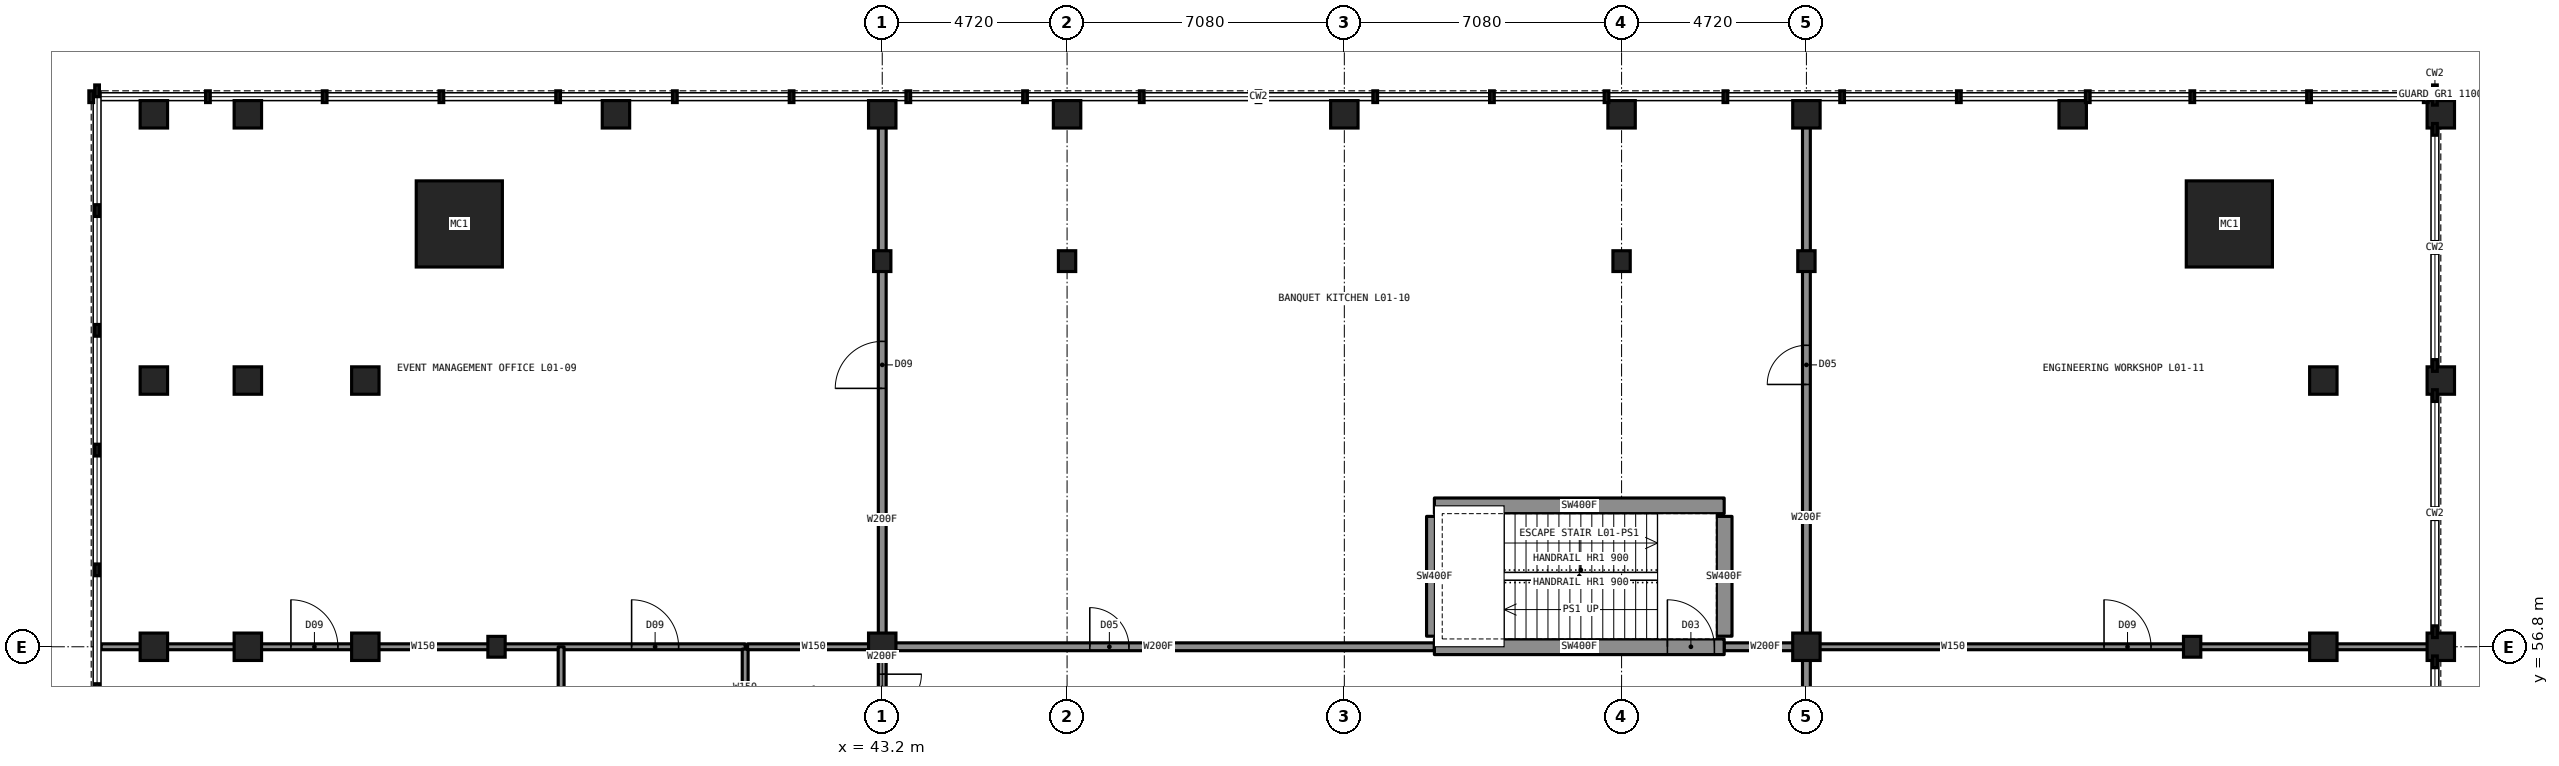
"""IFC4 building model, lengths in metres.
Left out: names, types, materials, properties, quantities, classifications, styles, units other than length and angle.
Written with IfcOpenShell. Run it as: python <this file> out.ifc"""

import sys

from ifc_helpers import new_model, si_unit, direction, frame, frame_2d, origin, origin_2d, place, context, subcontext, project, spatial, rectangle, hollow_rectangle, i_section, extrude, element, fill, save


model = new_model("IFC4")
c1 = context("Model", 3, precision=1e-05, world=origin(), true_north=direction((0.0, 1.0)))
c2 = subcontext(c1, "Body", "Model", "MODEL_VIEW")
j1 = project(units=[si_unit("LENGTHUNIT", "METRE"), si_unit("PLANEANGLEUNIT", "RADIAN")], contexts=[c1])
p1 = place(None, origin())
s1 = spatial("IfcSite", under=j1, at=p1, CompositionType="ELEMENT")
p2 = place(p1, origin())
s2 = spatial("IfcBuilding", under=s1, at=p2, CompositionType="ELEMENT")
p3 = place(p2, frame((0.0, 0.0, 5.6)))
s3 = spatial("IfcBuildingStorey", under=s2, at=p3, CompositionType="ELEMENT", Elevation=5.6)
for number, where, z_axis, x_axis in (
    (1, (33.35, 56.8, 0.0), (0.0, 0.0, 1.0), (1.0, 0.0, 0.0)),
    (2, (43.2, 66.65, 0.0), (0.0, 0.0, 1.0), (1.0, 0.0, 0.0)),
    (3, (47.92, 66.65, 0.0), (0.0, 0.0, 1.0), (1.0, 0.0, 0.0)),
    (4, (62.08, 66.65, 0.0), (0.0, 0.0, 1.0), (1.0, 0.0, 0.0)),
    (5, (66.8, 66.65, 0.0), (0.0, 0.0, 1.0), (1.0, 0.0, 0.0)),
    (6, (76.65, 56.8, 0.0), (0.0, 0.0, 1.0), (1.0, 0.0, 0.0)),
):
    element("IfcColumn", number, at=place(p3, frame(where, z_axis=z_axis, x_axis=x_axis)), inside=s3, PredefinedType="COLUMN", context=c2, shape_type="SweptSolid", body=[
        extrude(i_section(OverallWidth=0.442, OverallDepth=0.531, WebThickness=0.066, FlangeThickness=0.106, at=origin_2d()), origin(), (0.0, 0.0, 1.0), 5.4),
    ])
for number, where, z_axis, x_axis in (
    (7, (43.2, 56.8, 0.0), (0.0, 0.0, 1.0), (1.0, 0.0, 0.0)),
    (8, (66.8, 56.8, 0.0), (0.0, 0.0, 1.0), (1.0, 0.0, 0.0)),
):
    element("IfcColumn", number, at=place(p3, frame(where, z_axis=z_axis, x_axis=x_axis)), inside=s3, PredefinedType="COLUMN", context=c2, shape_type="SweptSolid", body=[
        extrude(hollow_rectangle(XDim=0.7, YDim=0.7, WallThickness=0.06, at=origin_2d()), origin(), (0.0, 0.0, 1.0), 5.4),
    ])
for number, where, z_axis, x_axis in (
    (9, (77.6, 67.6, 0.0), (0.0, 0.0, 1.0), (1.0, 0.0, 0.0)),
    (10, (32.4, 67.6, 0.0), (0.0, 0.0, 1.0), (1.0, 0.0, 0.0)),
):
    element("IfcColumn", number, at=place(p3, frame(where, z_axis=z_axis, x_axis=x_axis)), inside=s3, PredefinedType="COLUMN", context=c2, shape_type="SweptSolid", body=[
        extrude(hollow_rectangle(XDim=2.2, YDim=2.2, WallThickness=0.15, at=origin_2d()), origin(), (0.0, 0.0, 1.0), 5.4),
    ])
for number, where, z_axis, x_axis in (
    (11, (24.6, 56.8, 0.0), (0.0, 0.0, 1.0), (1.0, 0.0, 0.0)),
    (12, (24.6, 63.6, 0.0), (0.0, 0.0, 1.0), (1.0, 0.0, 0.0)),
    (13, (24.6, 70.4, 0.0), (0.0, 0.0, 1.0), (1.0, 0.0, 0.0)),
    (14, (27.0, 56.8, 0.0), (0.0, 0.0, 1.0), (1.0, 0.0, 0.0)),
    (15, (27.0, 63.6, 0.0), (0.0, 0.0, 1.0), (1.0, 0.0, 0.0)),
    (16, (27.0, 70.4, 0.0), (0.0, 0.0, 1.0), (1.0, 0.0, 0.0)),
    (17, (30.0, 56.8, 0.0), (0.0, 0.0, 1.0), (1.0, 0.0, 0.0)),
    (18, (30.0, 63.6, 0.0), (0.0, 0.0, 1.0), (1.0, 0.0, 0.0)),
    (19, (36.4, 70.4, 0.0), (0.0, 0.0, 1.0), (1.0, 0.0, 0.0)),
    (20, (43.2, 70.4, 0.0), (0.0, 0.0, 1.0), (1.0, 0.0, 0.0)),
    (21, (47.92, 70.4, 0.0), (0.0, 0.0, 1.0), (1.0, 0.0, 0.0)),
    (22, (55.0, 70.4, 0.0), (0.0, 0.0, 1.0), (1.0, 0.0, 0.0)),
    (23, (62.08, 70.4, 0.0), (0.0, 0.0, 1.0), (1.0, 0.0, 0.0)),
    (24, (66.8, 70.4, 0.0), (0.0, 0.0, 1.0), (1.0, 0.0, 0.0)),
    (25, (73.6, 70.4, 0.0), (0.0, 0.0, 1.0), (1.0, 0.0, 0.0)),
    (26, (80.0, 56.8, 0.0), (0.0, 0.0, 1.0), (1.0, 0.0, 0.0)),
    (27, (80.0, 63.6, 0.0), (0.0, 0.0, 1.0), (1.0, 0.0, 0.0)),
    (28, (83.0, 56.8, 0.0), (0.0, 0.0, 1.0), (1.0, 0.0, 0.0)),
    (29, (83.0, 63.6, 0.0), (0.0, 0.0, 1.0), (1.0, 0.0, 0.0)),
    (30, (83.0, 70.4, 0.0), (0.0, 0.0, 1.0), (1.0, 0.0, 0.0)),
):
    element("IfcColumn", number, at=place(p3, frame(where, z_axis=z_axis, x_axis=x_axis)), inside=s3, PredefinedType="COLUMN", context=c2, shape_type="SweptSolid", body=[
        extrude(rectangle(XDim=0.7, YDim=0.7, at=origin_2d()), origin(), (0.0, 0.0, 1.0), 5.4),
    ])
p4 = place(p3, frame((43.2, 56.8, 0.0), z_axis=(0.0, 0.0, 1.0), x_axis=(1.0, 0.0, 0.0)))
e31 = element("IfcWall", 31, at=p4, inside=s3, PredefinedType="PARTITIONING", context=c2, shape_type="SweptSolid", body=[
    extrude(rectangle(XDim=14.1, YDim=0.2, at=frame_2d((7.05, 0.0))), origin(), (0.0, 0.0, 1.0), 5.05),
])
p5 = place(p4, frame((5.3, 0.0, 0.0)))
e32 = element("IfcOpeningElement", 32, at=p5, cuts=e31, PredefinedType="OPENING", context=c2, shape_type="SweptSolid", body=[
    extrude(rectangle(XDim=1.0, YDim=2.1, at=frame_2d((0.5, 1.05))), frame((0.0, 0.11, 0.0), z_axis=(0.0, -1.0, 0.0), x_axis=(1.0, 0.0, 0.0)), (0.0, 0.0, 1.0), 0.22),
])
p6 = place(p3, frame((64.7, 56.8, 0.0), z_axis=(0.0, 0.0, 1.0), x_axis=(1.0, 0.0, 0.0)))
e33 = element("IfcWall", 33, at=p6, inside=s3, PredefinedType="PARTITIONING", context=c2, shape_type="SweptSolid", body=[
    extrude(rectangle(XDim=2.1, YDim=0.2, at=frame_2d((1.05, 0.0))), origin(), (0.0, 0.0, 1.0), 5.05),
])
p7 = place(p3, frame((23.255, 56.8, 0.0), z_axis=(0.0, 0.0, 1.0), x_axis=(1.0, 0.0, 0.0)))
e34 = element("IfcWall", 34, at=p7, inside=s3, PredefinedType="PARTITIONING", context=c2, shape_type="SweptSolid", body=[
    extrude(rectangle(XDim=16.445, YDim=0.15, at=frame_2d((8.223, 0.0))), origin(), (0.0, 0.0, 1.0), 5.05),
])
p8 = place(p7, frame((13.545, 0.0, 0.0)))
e35 = element("IfcOpeningElement", 35, at=p8, cuts=e34, PredefinedType="OPENING", context=c2, shape_type="SweptSolid", body=[
    extrude(rectangle(XDim=1.2, YDim=2.2, at=frame_2d((0.6, 1.1))), frame((0.0, 0.085, 0.0), z_axis=(0.0, -1.0, 0.0), x_axis=(1.0, 0.0, 0.0)), (0.0, 0.0, 1.0), 0.17),
])
p9 = place(p7, frame((4.845, 0.0, 0.0)))
e36 = element("IfcOpeningElement", 36, at=p9, cuts=e34, PredefinedType="OPENING", context=c2, shape_type="SweptSolid", body=[
    extrude(rectangle(XDim=1.2, YDim=2.2, at=frame_2d((0.6, 1.1))), frame((0.0, 0.085, 0.0), z_axis=(0.0, -1.0, 0.0), x_axis=(1.0, 0.0, 0.0)), (0.0, 0.0, 1.0), 0.17),
])
p10 = place(p3, frame((66.8, 56.8, 0.0), z_axis=(0.0, 0.0, 1.0), x_axis=(1.0, 0.0, 0.0)))
e37 = element("IfcWall", 37, at=p10, inside=s3, PredefinedType="PARTITIONING", context=c2, shape_type="SweptSolid", body=[
    extrude(rectangle(XDim=15.9, YDim=0.15, at=frame_2d((7.95, 0.0))), origin(), (0.0, 0.0, 1.0), 5.05),
])
p11 = place(p10, frame((7.6, 0.0, 0.0)))
e38 = element("IfcOpeningElement", 38, at=p11, cuts=e37, PredefinedType="OPENING", context=c2, shape_type="SweptSolid", body=[
    extrude(rectangle(XDim=1.2, YDim=2.2, at=frame_2d((0.6, 1.1))), frame((0.0, 0.085, 0.0), z_axis=(0.0, -1.0, 0.0), x_axis=(1.0, 0.0, 0.0)), (0.0, 0.0, 1.0), 0.17),
])
p12 = place(p3, frame((57.3, 56.8, 0.0), z_axis=(0.0, 0.0, 1.0), x_axis=(1.0, 0.0, 0.0)))
e39 = element("IfcWall", 39, at=p12, inside=s3, PredefinedType="SHEAR", context=c2, shape_type="SweptSolid", body=[
    extrude(rectangle(XDim=7.4, YDim=0.4, at=frame_2d((3.7, 0.0))), origin(), (0.0, 0.0, 1.0), 5.4),
])
p13 = place(p12, frame((5.95, 0.0, 0.0)))
e40 = element("IfcOpeningElement", 40, at=p13, cuts=e39, PredefinedType="OPENING", context=c2, shape_type="SweptSolid", body=[
    extrude(rectangle(XDim=1.2, YDim=2.2, at=frame_2d((0.6, 1.1))), frame((0.0, 0.21, 0.0), z_axis=(0.0, -1.0, 0.0), x_axis=(1.0, 0.0, 0.0)), (0.0, 0.0, 1.0), 0.42),
])
p14 = place(p3, frame((57.3, 60.4, 0.0), z_axis=(0.0, 0.0, 1.0), x_axis=(1.0, 0.0, 0.0)))
e41 = element("IfcWall", 41, at=p14, inside=s3, PredefinedType="SHEAR", context=c2, shape_type="SweptSolid", body=[
    extrude(rectangle(XDim=7.4, YDim=0.4, at=frame_2d((3.7, 0.0))), origin(), (0.0, 0.0, 1.0), 5.4),
])
p15 = place(p3, frame((43.2, 56.8, 0.0), z_axis=(0.0, 0.0, 1.0), x_axis=(0.0, 1.0, 0.0)))
e42 = element("IfcWall", 42, at=p15, inside=s3, PredefinedType="PARTITIONING", context=c2, shape_type="SweptSolid", body=[
    extrude(rectangle(XDim=13.9, YDim=0.2, at=frame_2d((6.95, 0.0))), origin(), (0.0, 0.0, 1.0), 5.05),
])
p16 = place(p15, frame((6.6, 0.0, 0.0)))
e43 = element("IfcOpeningElement", 43, at=p16, cuts=e42, PredefinedType="OPENING", context=c2, shape_type="SweptSolid", body=[
    extrude(rectangle(XDim=1.2, YDim=2.2, at=frame_2d((0.6, 1.1))), frame((0.0, 0.11, 0.0), z_axis=(0.0, -1.0, 0.0), x_axis=(1.0, 0.0, 0.0)), (0.0, 0.0, 1.0), 0.22),
])
p17 = place(p3, frame((35.0, 33.2, 0.0), z_axis=(0.0, 0.0, 1.0), x_axis=(0.0, 1.0, 0.0)))
e44 = element("IfcWall", 44, at=p17, inside=s3, PredefinedType="PARTITIONING", context=c2, shape_type="SweptSolid", body=[
    extrude(rectangle(XDim=23.6, YDim=0.15, at=frame_2d((11.8, 0.0))), origin(), (0.0, 0.0, 1.0), 5.05),
])
p18 = place(p3, frame((66.8, 42.7, 0.0), z_axis=(0.0, 0.0, 1.0), x_axis=(0.0, 1.0, 0.0)))
e45 = element("IfcWall", 45, at=p18, inside=s3, PredefinedType="PARTITIONING", context=c2, shape_type="SweptSolid", body=[
    extrude(rectangle(XDim=14.1, YDim=0.2, at=frame_2d((7.05, 0.0))), origin(), (0.0, 0.0, 1.0), 5.05),
])
p19 = place(p18, frame((3.8, 0.0, 0.0)))
e46 = element("IfcOpeningElement", 46, at=p19, cuts=e45, PredefinedType="OPENING", context=c2, shape_type="SweptSolid", body=[
    extrude(rectangle(XDim=1.0, YDim=2.1, at=frame_2d((0.5, 1.05))), frame((0.0, 0.11, 0.0), z_axis=(0.0, -1.0, 0.0), x_axis=(1.0, 0.0, 0.0)), (0.0, 0.0, 1.0), 0.22),
])
p20 = place(p18, frame((8.7, 0.0, 0.0)))
e47 = element("IfcOpeningElement", 47, at=p20, cuts=e45, PredefinedType="OPENING", context=c2, shape_type="SweptSolid", body=[
    extrude(rectangle(XDim=1.2, YDim=2.2, at=frame_2d((0.6, 1.1))), frame((0.0, 0.11, 0.0), z_axis=(0.0, -1.0, 0.0), x_axis=(1.0, 0.0, 0.0)), (0.0, 0.0, 1.0), 0.22),
])
p21 = place(p3, frame((66.8, 56.8, 0.0), z_axis=(0.0, 0.0, 1.0), x_axis=(0.0, 1.0, 0.0)))
e48 = element("IfcWall", 48, at=p21, inside=s3, PredefinedType="PARTITIONING", context=c2, shape_type="SweptSolid", body=[
    extrude(rectangle(XDim=13.9, YDim=0.2, at=frame_2d((6.95, 0.0))), origin(), (0.0, 0.0, 1.0), 5.05),
])
p22 = place(p21, frame((6.7, 0.0, 0.0)))
e49 = element("IfcOpeningElement", 49, at=p22, cuts=e48, PredefinedType="OPENING", context=c2, shape_type="SweptSolid", body=[
    extrude(rectangle(XDim=1.0, YDim=2.1, at=frame_2d((0.5, 1.05))), frame((0.0, 0.11, 0.0), z_axis=(0.0, -1.0, 0.0), x_axis=(1.0, 0.0, 0.0)), (0.0, 0.0, 1.0), 0.22),
])
for number, where, z_axis, x_axis in (
    (50, (57.3, 57.07, 0.0), (0.0, 0.0, 1.0), (0.0, 1.0, 0.0)),
    (51, (64.7, 57.07, 0.0), (0.0, 0.0, 1.0), (0.0, 1.0, 0.0)),
):
    element("IfcWall", number, at=place(p3, frame(where, z_axis=z_axis, x_axis=x_axis)), inside=s3, PredefinedType="SHEAR", context=c2, shape_type="SweptSolid", body=[
        extrude(rectangle(XDim=3.06, YDim=0.4, at=frame_2d((1.53, 0.0))), origin(), (0.0, 0.0, 1.0), 5.4),
    ])
p23 = place(p3, frame((43.2, 56.74, 0.0), z_axis=(0.0, 0.0, 1.0), x_axis=(0.0, -1.0, 0.0)))
e52 = element("IfcWall", 52, at=p23, inside=s3, PredefinedType="PARTITIONING", context=c2, shape_type="SweptSolid", body=[
    extrude(rectangle(XDim=1.98, YDim=0.2, at=frame_2d((0.99, 0.0))), origin(), (0.0, 0.0, 1.0), 5.05),
])
p24 = place(p23, frame((0.64, 0.0, 0.0)))
e53 = element("IfcOpeningElement", 53, at=p24, cuts=e52, PredefinedType="OPENING", context=c2, shape_type="SweptSolid", body=[
    extrude(rectangle(XDim=1.0, YDim=2.1, at=frame_2d((0.5, 1.05))), frame((0.0, 0.11, 0.0), z_axis=(0.0, -1.0, 0.0), x_axis=(1.0, 0.0, 0.0)), (0.0, 0.0, 1.0), 0.22),
])
p25 = place(p3, frame((39.7, 54.76, 0.0), z_axis=(0.0, 0.0, 1.0), x_axis=(0.0, 1.0, 0.0)))
e54 = element("IfcWall", 54, at=p25, inside=s3, PredefinedType="PARTITIONING", context=c2, shape_type="SweptSolid", body=[
    extrude(rectangle(XDim=1.98, YDim=0.15, at=frame_2d((0.99, 0.0))), origin(), (0.0, 0.0, 1.0), 5.05),
])
p26 = place(p3, frame((39.76, 56.8, 0.0), z_axis=(0.0, 0.0, 1.0), x_axis=(1.0, 0.0, 0.0)))
e55 = element("IfcWall", 55, at=p26, inside=s3, PredefinedType="PARTITIONING", context=c2, shape_type="SweptSolid", body=[
    extrude(rectangle(XDim=3.38, YDim=0.15, at=frame_2d((1.69, 0.0))), origin(), (0.0, 0.0, 1.0), 5.05),
])
p27 = place(p13, origin())
e56 = element("IfcDoor", 56, at=p27, inside=s3, OperationType="SINGLE_SWING_LEFT", PredefinedType="DOOR", context=c2, shape_type="SweptSolid", body=[
    extrude(rectangle(XDim=1.2, YDim=2.2, at=frame_2d((0.6, 1.1))), frame((0.0, 0.025, 0.0), z_axis=(0.0, -1.0, 0.0), x_axis=(1.0, 0.0, 0.0)), (0.0, 0.0, 1.0), 0.05),
])
fill(e40, e56)
p28 = place(p8, origin())
e57 = element("IfcDoor", 57, at=p28, inside=s3, OperationType="SINGLE_SWING_LEFT", PredefinedType="DOOR", context=c2, shape_type="SweptSolid", body=[
    extrude(rectangle(XDim=1.2, YDim=2.2, at=frame_2d((0.6, 1.1))), frame((0.0, 0.025, 0.0), z_axis=(0.0, -1.0, 0.0), x_axis=(1.0, 0.0, 0.0)), (0.0, 0.0, 1.0), 0.05),
])
fill(e35, e57)
p29 = place(p16, origin())
e58 = element("IfcDoor", 58, at=p29, inside=s3, OperationType="SINGLE_SWING_LEFT", PredefinedType="DOOR", context=c2, shape_type="SweptSolid", body=[
    extrude(rectangle(XDim=1.2, YDim=2.2, at=frame_2d((0.6, 1.1))), frame((0.0, 0.025, 0.0), z_axis=(0.0, -1.0, 0.0), x_axis=(1.0, 0.0, 0.0)), (0.0, 0.0, 1.0), 0.05),
])
fill(e43, e58)
p30 = place(p9, origin())
e59 = element("IfcDoor", 59, at=p30, inside=s3, OperationType="SINGLE_SWING_LEFT", PredefinedType="DOOR", context=c2, shape_type="SweptSolid", body=[
    extrude(rectangle(XDim=1.2, YDim=2.2, at=frame_2d((0.6, 1.1))), frame((0.0, 0.025, 0.0), z_axis=(0.0, -1.0, 0.0), x_axis=(1.0, 0.0, 0.0)), (0.0, 0.0, 1.0), 0.05),
])
fill(e36, e59)
p31 = place(p5, origin())
e60 = element("IfcDoor", 60, at=p31, inside=s3, OperationType="SINGLE_SWING_LEFT", PredefinedType="DOOR", context=c2, shape_type="SweptSolid", body=[
    extrude(rectangle(XDim=1.0, YDim=2.1, at=frame_2d((0.5, 1.05))), frame((0.0, 0.025, 0.0), z_axis=(0.0, -1.0, 0.0), x_axis=(1.0, 0.0, 0.0)), (0.0, 0.0, 1.0), 0.05),
])
fill(e32, e60)
p32 = place(p22, origin())
e61 = element("IfcDoor", 61, at=p32, inside=s3, OperationType="SINGLE_SWING_LEFT", PredefinedType="DOOR", context=c2, shape_type="SweptSolid", body=[
    extrude(rectangle(XDim=1.0, YDim=2.1, at=frame_2d((0.5, 1.05))), frame((0.0, 0.025, 0.0), z_axis=(0.0, -1.0, 0.0), x_axis=(1.0, 0.0, 0.0)), (0.0, 0.0, 1.0), 0.05),
])
fill(e49, e61)
p33 = place(p11, origin())
e62 = element("IfcDoor", 62, at=p33, inside=s3, OperationType="SINGLE_SWING_LEFT", PredefinedType="DOOR", context=c2, shape_type="SweptSolid", body=[
    extrude(rectangle(XDim=1.2, YDim=2.2, at=frame_2d((0.6, 1.1))), frame((0.0, 0.025, 0.0), z_axis=(0.0, -1.0, 0.0), x_axis=(1.0, 0.0, 0.0)), (0.0, 0.0, 1.0), 0.05),
])
fill(e38, e62)
p34 = place(p24, origin())
e63 = element("IfcDoor", 63, at=p34, inside=s3, OperationType="SINGLE_SWING_LEFT", PredefinedType="DOOR", context=c2, shape_type="SweptSolid", body=[
    extrude(rectangle(XDim=1.0, YDim=2.1, at=frame_2d((0.5, 1.05))), frame((0.0, 0.025, 0.0), z_axis=(0.0, -1.0, 0.0), x_axis=(1.0, 0.0, 0.0)), (0.0, 0.0, 1.0), 0.05),
])
fill(e53, e63)
save(model, sys.argv[1])
